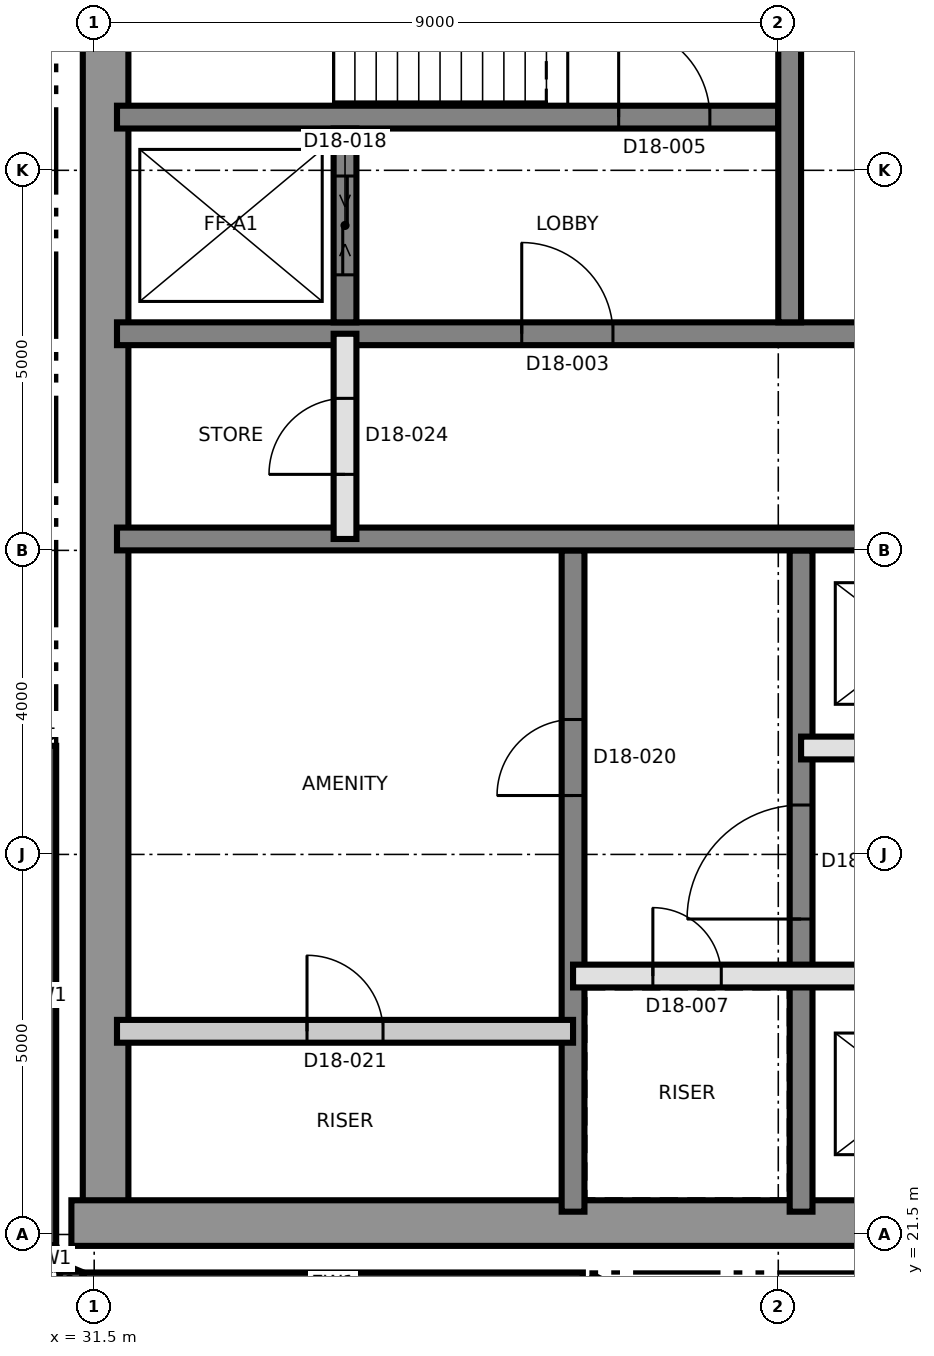
"""IFC4 building model, lengths in metres.
Left out: names, types, materials, properties, quantities, classifications, styles, units other than length and angle.
Written with IfcOpenShell. Run it as: python <this file> out.ifc"""

import sys

from ifc_helpers import new_model, si_unit, direction, frame, frame_2d, origin, place, context, subcontext, project, spatial, rectangle, extrude, element, fill, save


model = new_model("IFC4")
c1 = context("Model", 3, precision=1e-05, world=origin(), true_north=direction((0.0, 1.0)))
c2 = subcontext(c1, "Body", "Model", "MODEL_VIEW")
j1 = project(units=[si_unit("LENGTHUNIT", "METRE"), si_unit("PLANEANGLEUNIT", "RADIAN")], contexts=[c1])
p1 = place(None, origin())
s1 = spatial("IfcSite", under=j1, at=p1, CompositionType="ELEMENT")
p2 = place(p1, origin())
s2 = spatial("IfcBuilding", under=s1, at=p2, CompositionType="ELEMENT")
p3 = place(p2, frame((0.0, 0.0, 175.5)))
s3 = spatial("IfcBuildingStorey", under=s2, at=p3, CompositionType="ELEMENT", Elevation=175.5)
p4 = place(p3, frame((31.65, 21.8, 0.0), z_axis=(0.0, 0.0, 1.0), x_axis=(0.0, 1.0, 0.0)))
e1 = element("IfcWall", 1, at=p4, inside=s3, PredefinedType="SHEAR", context=c2, shape_type="SweptSolid", body=[
    extrude(rectangle(XDim=17.4, YDim=0.6, at=frame_2d((8.7, 0.0))), origin(), (0.0, 0.0, 1.0), 3.7),
])
p5 = place(p3, frame((31.2, 21.65, 0.0), z_axis=(0.0, 0.0, 1.0), x_axis=(1.0, 0.0, 0.0)))
e2 = element("IfcWall", 2, at=p5, inside=s3, PredefinedType="SHEAR", context=c2, shape_type="SweptSolid", body=[
    extrude(rectangle(XDim=27.0, YDim=0.6, at=frame_2d((13.5, 0.0))), origin(), (0.0, 0.0, 1.0), 3.7),
])
p6 = place(p3, frame((37.8, 21.8, 0.0), z_axis=(0.0, 0.0, 1.0), x_axis=(0.0, 1.0, 0.0)))
e3 = element("IfcWall", 3, at=p6, inside=s3, PredefinedType="SHEAR", context=c2, shape_type="SweptSolid", body=[
    extrude(rectangle(XDim=8.7, YDim=0.3, at=frame_2d((4.35, 0.0))), origin(), (0.0, 0.0, 1.0), 3.7),
])
p7 = place(p6, frame((5.475, 0.0, 0.0)))
e4 = element("IfcOpeningElement", 4, at=p7, cuts=e3, PredefinedType="OPENING", context=c2, shape_type="SweptSolid", body=[
    extrude(rectangle(XDim=1.0, YDim=2.1, at=frame_2d((0.5, 1.05))), frame((0.0, 0.16, 0.0), z_axis=(0.0, -1.0, 0.0), x_axis=(1.0, 0.0, 0.0)), (0.0, 0.0, 1.0), 0.32),
])
p8 = place(p3, frame((40.8, 21.8, 0.0), z_axis=(0.0, 0.0, 1.0), x_axis=(0.0, 1.0, 0.0)))
e5 = element("IfcWall", 5, at=p8, inside=s3, PredefinedType="SHEAR", context=c2, shape_type="SweptSolid", body=[
    extrude(rectangle(XDim=8.7, YDim=0.3, at=frame_2d((4.35, 0.0))), origin(), (0.0, 0.0, 1.0), 3.7),
])
p9 = place(p8, frame((3.85, 0.0, 0.0)))
e6 = element("IfcOpeningElement", 6, at=p9, cuts=e5, PredefinedType="OPENING", context=c2, shape_type="SweptSolid", body=[
    extrude(rectangle(XDim=1.5, YDim=2.1, at=frame_2d((0.75, 1.05))), frame((0.0, 0.16, 0.0), z_axis=(0.0, -1.0, 0.0), x_axis=(1.0, 0.0, 0.0)), (0.0, 0.0, 1.0), 0.32),
])
p10 = place(p3, frame((31.8, 30.65, 0.0), z_axis=(0.0, 0.0, 1.0), x_axis=(1.0, 0.0, 0.0)))
e7 = element("IfcWall", 7, at=p10, inside=s3, PredefinedType="SHEAR", context=c2, shape_type="SweptSolid", body=[
    extrude(rectangle(XDim=26.4, YDim=0.3, at=frame_2d((13.2, 0.0))), origin(), (0.0, 0.0, 1.0), 3.7),
])
p11 = place(p10, frame((24.7, 0.0, 0.0)))
e8 = element("IfcOpeningElement", 8, at=p11, cuts=e7, PredefinedType="OPENING", context=c2, shape_type="SweptSolid", body=[
    extrude(rectangle(XDim=1.0, YDim=2.1, at=frame_2d((0.5, 1.05))), frame((0.0, 0.16, 0.0), z_axis=(0.0, -1.0, 0.0), x_axis=(1.0, 0.0, 0.0)), (0.0, 0.0, 1.0), 0.32),
])
p12 = place(p3, frame((31.8, 33.35, 0.0), z_axis=(0.0, 0.0, 1.0), x_axis=(1.0, 0.0, 0.0)))
e9 = element("IfcWall", 9, at=p12, inside=s3, PredefinedType="SHEAR", context=c2, shape_type="SweptSolid", body=[
    extrude(rectangle(XDim=26.4, YDim=0.3, at=frame_2d((13.2, 0.0))), origin(), (0.0, 0.0, 1.0), 3.7),
])
p13 = place(p12, frame((13.85, 0.0, 0.0)))
e10 = element("IfcOpeningElement", 10, at=p13, cuts=e9, PredefinedType="OPENING", context=c2, shape_type="SweptSolid", body=[
    extrude(rectangle(XDim=1.4, YDim=2.1, at=frame_2d((0.7, 1.05))), frame((0.0, 0.16, 0.0), z_axis=(0.0, -1.0, 0.0), x_axis=(1.0, 0.0, 0.0)), (0.0, 0.0, 1.0), 0.32),
])
p14 = place(p12, frame((5.325, 0.0, 0.0)))
e11 = element("IfcOpeningElement", 11, at=p14, cuts=e9, PredefinedType="OPENING", context=c2, shape_type="SweptSolid", body=[
    extrude(rectangle(XDim=1.2, YDim=2.1, at=frame_2d((0.6, 1.05))), frame((0.0, 0.16, 0.0), z_axis=(0.0, -1.0, 0.0), x_axis=(1.0, 0.0, 0.0)), (0.0, 0.0, 1.0), 0.32),
])
p15 = place(p12, frame((19.875, 0.0, 0.0)))
e12 = element("IfcOpeningElement", 12, at=p15, cuts=e9, PredefinedType="OPENING", context=c2, shape_type="SweptSolid", body=[
    extrude(rectangle(XDim=1.2, YDim=2.1, at=frame_2d((0.6, 1.05))), frame((0.0, 0.16, 0.0), z_axis=(0.0, -1.0, 0.0), x_axis=(1.0, 0.0, 0.0)), (0.0, 0.0, 1.0), 0.32),
])
p16 = place(p3, frame((31.8, 36.2, 0.0), z_axis=(0.0, 0.0, 1.0), x_axis=(1.0, 0.0, 0.0)))
e13 = element("IfcWall", 13, at=p16, inside=s3, PredefinedType="SHEAR", context=c2, shape_type="SweptSolid", body=[
    extrude(rectangle(XDim=8.7, YDim=0.3, at=frame_2d((4.35, 0.0))), origin(), (0.0, 0.0, 1.0), 3.7),
])
p17 = place(p16, frame((6.6, 0.0, 0.0)))
e14 = element("IfcOpeningElement", 14, at=p17, cuts=e13, PredefinedType="OPENING", context=c2, shape_type="SweptSolid", body=[
    extrude(rectangle(XDim=1.2, YDim=2.1, at=frame_2d((0.6, 1.05))), frame((0.0, 0.16, 0.0), z_axis=(0.0, -1.0, 0.0), x_axis=(1.0, 0.0, 0.0)), (0.0, 0.0, 1.0), 0.32),
])
p18 = place(p3, frame((40.65, 33.5, 0.0), z_axis=(0.0, 0.0, 1.0), x_axis=(0.0, 1.0, 0.0)))
e15 = element("IfcWall", 15, at=p18, inside=s3, PredefinedType="SHEAR", context=c2, shape_type="SweptSolid", body=[
    extrude(rectangle(XDim=5.7, YDim=0.3, at=frame_2d((2.85, 0.0))), origin(), (0.0, 0.0, 1.0), 3.7),
])
p19 = place(p3, frame((34.8, 33.5, 0.0), z_axis=(0.0, 0.0, 1.0), x_axis=(0.0, 1.0, 0.0)))
e16 = element("IfcWall", 16, at=p19, inside=s3, PredefinedType="SHEAR", context=c2, shape_type="SweptSolid", body=[
    extrude(rectangle(XDim=2.55, YDim=0.3, at=frame_2d((1.275, 0.0))), origin(), (0.0, 0.0, 1.0), 3.7),
])
p20 = place(p19, frame((0.625, 0.0, 0.0)))
e17 = element("IfcOpeningElement", 17, at=p20, cuts=e16, PredefinedType="OPENING", context=c2, shape_type="SweptSolid", body=[
    extrude(rectangle(XDim=1.3, YDim=2.4, at=frame_2d((0.65, 1.2))), frame((0.0, 0.16, 0.0), z_axis=(0.0, -1.0, 0.0), x_axis=(1.0, 0.0, 0.0)), (0.0, 0.0, 1.0), 0.32),
])
p21 = place(p3, frame((30.85, 27.929, 0.0), z_axis=(0.0, 0.0, 1.0), x_axis=(0.0, -1.0, 0.0)))
e18 = element("IfcWall", 18, at=p21, inside=s3, PredefinedType="SOLIDWALL", context=c2, shape_type="SweptSolid", body=[
    extrude(rectangle(XDim=6.569, YDim=0.3, at=frame_2d((3.285, 0.0))), origin(), (0.0, 0.0, 1.0), 3.4),
])
for number, where, z_axis, x_axis in (
    (19, (30.861, 21.302, 0.0), (0.0, 0.0, 1.0), (0.383, -0.924, 0.0)),
    (20, (31.048, 20.967, 0.0), (0.0, 0.0, 1.0), (0.924, -0.383, 0.0)),
):
    element("IfcWall", number, at=place(p3, frame(where, z_axis=z_axis, x_axis=x_axis)), inside=s3, PredefinedType="SOLIDWALL", context=c2, shape_type="SweptSolid", body=[
        extrude(rectangle(XDim=0.275, YDim=0.3, at=frame_2d((0.138, 0.0))), origin(), (0.0, 0.0, 1.0), 3.4),
    ])
p22 = place(p3, frame((31.36, 20.85, 0.0), z_axis=(0.0, 0.0, 1.0), x_axis=(1.0, 0.0, 0.0)))
e21 = element("IfcWall", 21, at=p22, inside=s3, PredefinedType="SOLIDWALL", context=c2, shape_type="SweptSolid", body=[
    extrude(rectangle(XDim=6.569, YDim=0.3, at=frame_2d((3.285, 0.0))), origin(), (0.0, 0.0, 1.0), 3.4),
])
for number, where, z_axis, x_axis in (
    (22, (37.995, 20.834, 0.0), (0.0, 0.0, 1.0), (0.897, -0.442, 0.0)),
    (23, (30.613, 28.444, 0.0), (0.0, 0.0, 1.0), (0.442, -0.897, 0.0)),
):
    element("IfcWall", number, at=place(p3, frame(where, z_axis=z_axis, x_axis=x_axis)), inside=s3, PredefinedType="SOLIDWALL", context=c2, shape_type="SweptSolid", body=[
        extrude(rectangle(XDim=0.501, YDim=0.3, at=frame_2d((0.25, 0.0))), origin(), (0.0, 0.0, 1.0), 3.4),
    ])
p23 = place(p3, frame((31.8, 24.173, 0.0), z_axis=(0.0, 0.0, 1.0), x_axis=(1.0, 0.0, 0.0)))
e24 = element("IfcWall", 24, at=p23, inside=s3, PredefinedType="PARTITIONING", context=c2, shape_type="SweptSolid", body=[
    extrude(rectangle(XDim=6.0, YDim=0.3, at=frame_2d((3.0, 0.0))), origin(), (0.0, 0.0, 1.0), 3.4),
])
p24 = place(p23, frame((2.5, 0.0, 0.0)))
e25 = element("IfcOpeningElement", 25, at=p24, cuts=e24, PredefinedType="OPENING", context=c2, shape_type="SweptSolid", body=[
    extrude(rectangle(XDim=1.0, YDim=2.1, at=frame_2d((0.5, 1.05))), frame((0.0, 0.16, 0.0), z_axis=(0.0, -1.0, 0.0), x_axis=(1.0, 0.0, 0.0)), (0.0, 0.0, 1.0), 0.32),
])
p25 = place(p3, frame((37.8, 24.9, 0.0), z_axis=(0.0, 0.0, 1.0), x_axis=(1.0, 0.0, 0.0)))
e26 = element("IfcWall", 26, at=p25, inside=s3, PredefinedType="SOLIDWALL", context=c2, shape_type="SweptSolid", body=[
    extrude(rectangle(XDim=12.0, YDim=0.3, at=frame_2d((6.0, 0.0))), origin(), (0.0, 0.0, 1.0), 3.4),
])
p26 = place(p25, frame((1.05, 0.0, 0.0)))
e27 = element("IfcOpeningElement", 27, at=p26, cuts=e26, PredefinedType="OPENING", context=c2, shape_type="SweptSolid", body=[
    extrude(rectangle(XDim=0.9, YDim=2.1, at=frame_2d((0.45, 1.05))), frame((0.0, 0.16, 0.0), z_axis=(0.0, -1.0, 0.0), x_axis=(1.0, 0.0, 0.0)), (0.0, 0.0, 1.0), 0.32),
])
p27 = place(p25, frame((10.05, 0.0, 0.0)))
e28 = element("IfcOpeningElement", 28, at=p27, cuts=e26, PredefinedType="OPENING", context=c2, shape_type="SweptSolid", body=[
    extrude(rectangle(XDim=0.9, YDim=2.1, at=frame_2d((0.45, 1.05))), frame((0.0, 0.16, 0.0), z_axis=(0.0, -1.0, 0.0), x_axis=(1.0, 0.0, 0.0)), (0.0, 0.0, 1.0), 0.32),
])
p28 = place(p25, frame((3.95, 0.0, 0.0)))
e29 = element("IfcOpeningElement", 29, at=p28, cuts=e26, PredefinedType="OPENING", context=c2, shape_type="SweptSolid", body=[
    extrude(rectangle(XDim=1.1, YDim=2.4, at=frame_2d((0.55, 1.2))), frame((0.0, 0.16, 0.0), z_axis=(0.0, -1.0, 0.0), x_axis=(1.0, 0.0, 0.0)), (0.0, 0.0, 1.0), 0.32),
])
p29 = place(p25, frame((6.95, 0.0, 0.0)))
e30 = element("IfcOpeningElement", 30, at=p29, cuts=e26, PredefinedType="OPENING", context=c2, shape_type="SweptSolid", body=[
    extrude(rectangle(XDim=1.1, YDim=2.4, at=frame_2d((0.55, 1.2))), frame((0.0, 0.16, 0.0), z_axis=(0.0, -1.0, 0.0), x_axis=(1.0, 0.0, 0.0)), (0.0, 0.0, 1.0), 0.32),
])
p30 = place(p3, frame((40.8, 27.9, 0.0), z_axis=(0.0, 0.0, 1.0), x_axis=(1.0, 0.0, 0.0)))
e31 = element("IfcWall", 31, at=p30, inside=s3, PredefinedType="SOLIDWALL", context=c2, shape_type="SweptSolid", body=[
    extrude(rectangle(XDim=6.0, YDim=0.3, at=frame_2d((3.0, 0.0))), origin(), (0.0, 0.0, 1.0), 3.4),
])
p31 = place(p30, frame((0.95, 0.0, 0.0)))
e32 = element("IfcOpeningElement", 32, at=p31, cuts=e31, PredefinedType="OPENING", context=c2, shape_type="SweptSolid", body=[
    extrude(rectangle(XDim=1.1, YDim=2.4, at=frame_2d((0.55, 1.2))), frame((0.0, 0.16, 0.0), z_axis=(0.0, -1.0, 0.0), x_axis=(1.0, 0.0, 0.0)), (0.0, 0.0, 1.0), 0.32),
])
p32 = place(p30, frame((3.95, 0.0, 0.0)))
e33 = element("IfcOpeningElement", 33, at=p32, cuts=e31, PredefinedType="OPENING", context=c2, shape_type="SweptSolid", body=[
    extrude(rectangle(XDim=1.1, YDim=2.4, at=frame_2d((0.55, 1.2))), frame((0.0, 0.16, 0.0), z_axis=(0.0, -1.0, 0.0), x_axis=(1.0, 0.0, 0.0)), (0.0, 0.0, 1.0), 0.32),
])
p33 = place(p3, frame((34.8, 30.65, 0.0), z_axis=(0.0, 0.0, 1.0), x_axis=(0.0, 1.0, 0.0)))
e34 = element("IfcWall", 34, at=p33, inside=s3, PredefinedType="SOLIDWALL", context=c2, shape_type="SweptSolid", body=[
    extrude(rectangle(XDim=2.7, YDim=0.3, at=frame_2d((1.35, 0.0))), origin(), (0.0, 0.0, 1.0), 3.4),
])
p34 = place(p33, frame((0.85, 0.0, 0.0)))
e35 = element("IfcOpeningElement", 35, at=p34, cuts=e34, PredefinedType="OPENING", context=c2, shape_type="SweptSolid", body=[
    extrude(rectangle(XDim=1.0, YDim=2.1, at=frame_2d((0.5, 1.05))), frame((0.0, 0.16, 0.0), z_axis=(0.0, -1.0, 0.0), x_axis=(1.0, 0.0, 0.0)), (0.0, 0.0, 1.0), 0.32),
])
p35 = place(p9, origin())
e36 = element("IfcDoor", 36, at=p35, inside=s3, OperationType="SINGLE_SWING_RIGHT", PredefinedType="DOOR", context=c2, shape_type="SweptSolid", body=[
    extrude(rectangle(XDim=1.5, YDim=2.1, at=frame_2d((0.75, 1.05))), frame((0.0, 0.025, 0.0), z_axis=(0.0, -1.0, 0.0), x_axis=(1.0, 0.0, 0.0)), (0.0, 0.0, 1.0), 0.05),
])
fill(e6, e36)
p36 = place(p14, origin())
e37 = element("IfcDoor", 37, at=p36, inside=s3, OperationType="SINGLE_SWING_LEFT", PredefinedType="DOOR", context=c2, shape_type="SweptSolid", body=[
    extrude(rectangle(XDim=1.2, YDim=2.1, at=frame_2d((0.6, 1.05))), frame((0.0, 0.025, 0.0), z_axis=(0.0, -1.0, 0.0), x_axis=(1.0, 0.0, 0.0)), (0.0, 0.0, 1.0), 0.05),
])
fill(e11, e37)
p37 = place(p17, origin())
e38 = element("IfcDoor", 38, at=p37, inside=s3, OperationType="SINGLE_SWING_RIGHT", PredefinedType="DOOR", context=c2, shape_type="SweptSolid", body=[
    extrude(rectangle(XDim=1.2, YDim=2.1, at=frame_2d((0.6, 1.05))), frame((0.0, 0.025, 0.0), z_axis=(0.0, -1.0, 0.0), x_axis=(1.0, 0.0, 0.0)), (0.0, 0.0, 1.0), 0.05),
])
fill(e14, e38)
p38 = place(p26, origin())
e39 = element("IfcDoor", 39, at=p38, inside=s3, OperationType="SINGLE_SWING_LEFT", PredefinedType="DOOR", context=c2, shape_type="SweptSolid", body=[
    extrude(rectangle(XDim=0.9, YDim=2.1, at=frame_2d((0.45, 1.05))), frame((0.0, 0.025, 0.0), z_axis=(0.0, -1.0, 0.0), x_axis=(1.0, 0.0, 0.0)), (0.0, 0.0, 1.0), 0.05),
])
fill(e27, e39)
p39 = place(p20, origin())
e40 = element("IfcDoor", 40, at=p39, inside=s3, OperationType="SLIDING_TO_LEFT", PredefinedType="DOOR", context=c2, shape_type="SweptSolid", body=[
    extrude(rectangle(XDim=1.3, YDim=2.4, at=frame_2d((0.65, 1.2))), frame((0.0, 0.025, 0.0), z_axis=(0.0, -1.0, 0.0), x_axis=(1.0, 0.0, 0.0)), (0.0, 0.0, 1.0), 0.05),
])
fill(e17, e40)
p40 = place(p7, origin())
e41 = element("IfcDoor", 41, at=p40, inside=s3, OperationType="SINGLE_SWING_LEFT", PredefinedType="DOOR", context=c2, shape_type="SweptSolid", body=[
    extrude(rectangle(XDim=1.0, YDim=2.1, at=frame_2d((0.5, 1.05))), frame((0.0, 0.025, 0.0), z_axis=(0.0, -1.0, 0.0), x_axis=(1.0, 0.0, 0.0)), (0.0, 0.0, 1.0), 0.05),
])
fill(e4, e41)
p41 = place(p24, origin())
e42 = element("IfcDoor", 42, at=p41, inside=s3, OperationType="SINGLE_SWING_RIGHT", PredefinedType="DOOR", context=c2, shape_type="SweptSolid", body=[
    extrude(rectangle(XDim=1.0, YDim=2.1, at=frame_2d((0.5, 1.05))), frame((0.0, 0.025, 0.0), z_axis=(0.0, -1.0, 0.0), x_axis=(1.0, 0.0, 0.0)), (0.0, 0.0, 1.0), 0.05),
])
fill(e25, e42)
p42 = place(p34, origin())
e43 = element("IfcDoor", 43, at=p42, inside=s3, OperationType="SINGLE_SWING_LEFT", PredefinedType="DOOR", context=c2, shape_type="SweptSolid", body=[
    extrude(rectangle(XDim=1.0, YDim=2.1, at=frame_2d((0.5, 1.05))), frame((0.0, 0.025, 0.0), z_axis=(0.0, -1.0, 0.0), x_axis=(1.0, 0.0, 0.0)), (0.0, 0.0, 1.0), 0.05),
])
fill(e35, e43)
save(model, sys.argv[1])
